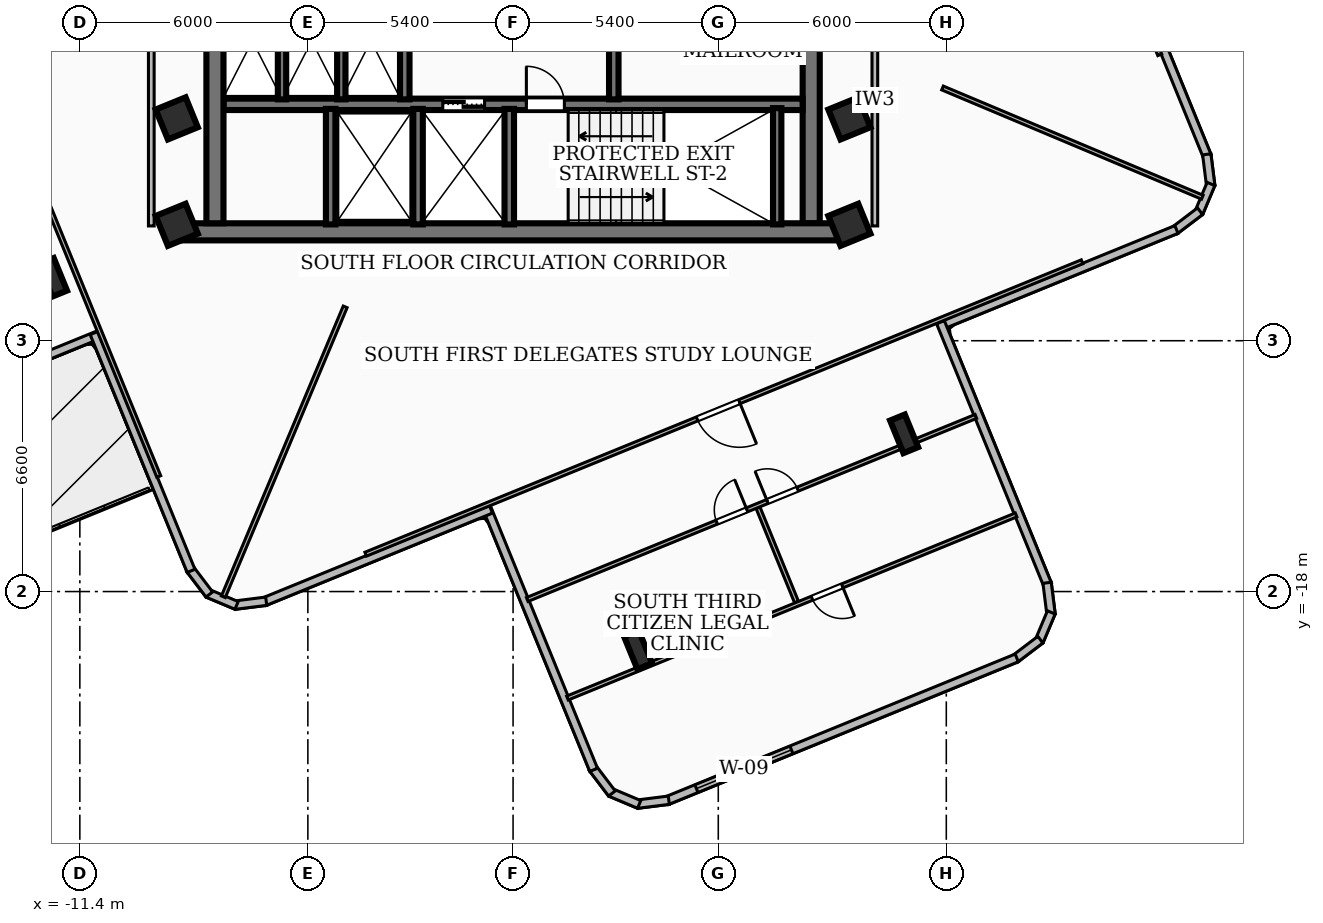
"""IFC4 building model, lengths in metres.
Left out: names, types, materials, properties, quantities, classifications, styles, units other than length and angle.
Written with IfcOpenShell. Run it as: python <this file> out.ifc"""

import sys

from ifc_helpers import new_model, si_unit, direction, frame, frame_2d, origin, origin_2d, place, context, subcontext, project, spatial, rectangle, i_section, extrude, element, fill, save


model = new_model("IFC4")
c1 = context("Model", 3, precision=1e-05, world=origin(), true_north=direction((0.0, 1.0)))
c2 = subcontext(c1, "Body", "Model", "MODEL_VIEW")
j1 = project(units=[si_unit("LENGTHUNIT", "METRE"), si_unit("PLANEANGLEUNIT", "RADIAN")], contexts=[c1])
p1 = place(None, origin())
s1 = spatial("IfcSite", under=j1, at=p1, CompositionType="ELEMENT")
p2 = place(p1, origin())
s2 = spatial("IfcBuilding", under=s1, at=p2, CompositionType="ELEMENT")
p3 = place(p2, frame((0.0, 0.0, 177.48)))
s3 = spatial("IfcBuildingStorey", under=s2, at=p3, CompositionType="ELEMENT", Elevation=177.48)
p4 = place(p3, frame((8.78, -8.535, 0.0), z_axis=(0.0, 0.0, 1.0), x_axis=(-1.0, 0.0, 0.0)))
e1 = element("IfcWall", 1, at=p4, inside=s3, PredefinedType="SHEAR", context=c2, shape_type="SweptSolid", body=[
    extrude(rectangle(XDim=17.56, YDim=0.45, at=frame_2d((8.78, 0.0))), origin(), (0.0, 0.0, 1.0), 3.34),
])
for number, where, z_axis, x_axis in (
    (2, (-7.845, -8.31, 0.0), (0.0, 0.0, 1.0), (0.0, 1.0, 0.0)),
    (3, (7.845, -1.975, 0.0), (0.0, 0.0, 1.0), (0.0, -1.0, 0.0)),
):
    element("IfcWall", number, at=place(p3, frame(where, z_axis=z_axis, x_axis=x_axis)), inside=s3, PredefinedType="SHEAR", context=c2, shape_type="SweptSolid", body=[
        extrude(rectangle(XDim=6.335, YDim=0.45, at=frame_2d((3.167, 0.0))), origin(), (0.0, 0.0, 1.0), 3.34),
    ])
p5 = place(p3, frame((-7.62, -5.18, 0.0), z_axis=(0.0, 0.0, 1.0), x_axis=(1.0, 0.0, 0.0)))
e4 = element("IfcWall", 4, at=p5, inside=s3, PredefinedType="SOLIDWALL", context=c2, shape_type="SweptSolid", body=[
    extrude(rectangle(XDim=15.24, YDim=0.3, at=frame_2d((7.62, 0.0))), origin(), (0.0, 0.0, 1.0), 3.34),
])
p6 = place(p5, frame((5.77, 0.0, 0.0)))
e5 = element("IfcOpeningElement", 5, at=p6, cuts=e4, PredefinedType="OPENING", context=c2, shape_type="SweptSolid", body=[
    extrude(rectangle(XDim=1.1, YDim=2.15, at=frame_2d((0.55, 1.075))), frame((0.0, 0.16, 0.0), z_axis=(0.0, -1.0, 0.0), x_axis=(1.0, 0.0, 0.0)), (0.0, 0.0, 1.0), 0.32),
])
p7 = place(p5, frame((7.97, 0.0, 0.0)))
e6 = element("IfcOpeningElement", 6, at=p7, cuts=e4, PredefinedType="OPENING", context=c2, shape_type="SweptSolid", body=[
    extrude(rectangle(XDim=1.0, YDim=2.1, at=frame_2d((0.5, 1.05))), frame((0.0, 0.16, 0.0), z_axis=(0.0, -1.0, 0.0), x_axis=(1.0, 0.0, 0.0)), (0.0, 0.0, 1.0), 0.32),
])
p8 = place(p3, frame((6.95, -8.34, 0.0), z_axis=(0.0, 0.0, 1.0), x_axis=(0.0, 1.0, 0.0)))
e7 = element("IfcWall", 7, at=p8, inside=s3, PredefinedType="SOLIDWALL", context=c2, shape_type="SweptSolid", body=[
    extrude(rectangle(XDim=3.06, YDim=0.22, at=frame_2d((1.53, 0.0))), origin(), (0.0, 0.0, 1.0), 3.34),
])
for number, where, z_axis, x_axis in (
    (8, (-0.1, -8.34, 0.0), (0.0, 0.0, 1.0), (0.0, 1.0, 0.0)),
    (9, (-2.5, -8.34, 0.0), (0.0, 0.0, 1.0), (0.0, 1.0, 0.0)),
    (10, (-4.8, -8.34, 0.0), (0.0, 0.0, 1.0), (0.0, 1.0, 0.0)),
):
    element("IfcWall", number, at=place(p3, frame(where, z_axis=z_axis, x_axis=x_axis)), inside=s3, PredefinedType="SOLIDWALL", context=c2, shape_type="SweptSolid", body=[
        extrude(rectangle(XDim=3.04, YDim=0.25, at=frame_2d((1.52, 0.0))), origin(), (0.0, 0.0, 1.0), 3.34),
    ])
for number, where, z_axis, x_axis in (
    (11, (-2.85, -5.05, 0.0), (0.0, 0.0, 1.0), (0.0, 1.0, 0.0)),
    (12, (2.65, -5.05, 0.0), (0.0, 0.0, 1.0), (0.0, 1.0, 0.0)),
):
    element("IfcWall", number, at=place(p3, frame(where, z_axis=z_axis, x_axis=x_axis)), inside=s3, PredefinedType="SOLIDWALL", context=c2, shape_type="SweptSolid", body=[
        extrude(rectangle(XDim=3.07, YDim=0.25, at=frame_2d((1.535, 0.0))), origin(), (0.0, 0.0, 1.0), 3.34),
    ])
for number, where, z_axis, x_axis in (
    (13, (-6.08, -5.05, 0.0), (0.0, 0.0, 1.0), (0.0, 1.0, 0.0)),
    (14, (-4.52, -5.05, 0.0), (0.0, 0.0, 1.0), (0.0, 1.0, 0.0)),
):
    element("IfcWall", number, at=place(p3, frame(where, z_axis=z_axis, x_axis=x_axis)), inside=s3, PredefinedType="SOLIDWALL", context=c2, shape_type="SweptSolid", body=[
        extrude(rectangle(XDim=3.07, YDim=0.22, at=frame_2d((1.535, 0.0))), origin(), (0.0, 0.0, 1.0), 3.34),
    ])
for number, where, z_axis, x_axis in (
    (15, (-8.85, -5.55, 0.0), (0.0, 0.0, 1.0), (0.926, 0.378, 0.0)),
    (16, (8.85, -5.55, 0.0), (0.0, 0.0, 1.0), (0.926, 0.378, 0.0)),
    (17, (8.85, -8.35, 0.0), (0.0, 0.0, 1.0), (0.926, 0.378, 0.0)),
    (18, (-8.85, -8.35, 0.0), (0.0, 0.0, 1.0), (0.926, 0.378, 0.0)),
):
    element("IfcColumn", number, at=place(p3, frame(where, z_axis=z_axis, x_axis=x_axis)), inside=s3, PredefinedType="COLUMN", context=c2, shape_type="SweptSolid", body=[
        extrude(rectangle(XDim=0.85, YDim=0.85, at=origin_2d()), origin(), (0.0, 0.0, 1.0), 3.6),
    ])
for number, where, z_axis, x_axis in (
    (19, (-12.106, -9.731, 0.0), (0.0, 0.0, 1.0), (0.926, 0.378, 0.0)),
    (20, (3.29, -19.536, 0.0), (0.0, 0.0, 1.0), (0.926, 0.378, 0.0)),
    (21, (10.29, -13.85, 0.0), (0.0, 0.0, 1.0), (0.926, 0.378, 0.0)),
):
    element("IfcColumn", number, at=place(p3, frame(where, z_axis=z_axis, x_axis=x_axis)), inside=s3, PredefinedType="COLUMN", context=c2, shape_type="SweptSolid", body=[
        extrude(i_section(OverallWidth=0.418, OverallDepth=0.927, WebThickness=0.019, FlangeThickness=0.032, at=origin_2d()), origin(), (0.0, 0.0, 1.0), 3.6),
    ])
p9 = place(p3, frame((-10.912, -11.246, 0.0), z_axis=(0.0, 0.0, 1.0), x_axis=(-0.925847643695, -0.377896997427, 0.0)))
e22 = element("IfcWall", 22, at=p9, inside=s3, PredefinedType="SOLIDWALL", context=c2, shape_type="SweptSolid", body=[
    extrude(rectangle(XDim=9.058, YDim=0.22, at=frame_2d((4.529, 0.0))), origin(), (0.0, 0.0, 1.0), 3.34),
])
p10 = place(p9, frame((4.4, 0.0, 0.0)))
e23 = element("IfcOpeningElement", 23, at=p10, cuts=e22, PredefinedType="OPENING", context=c2, shape_type="SweptSolid", body=[
    extrude(rectangle(XDim=1.1, YDim=2.1, at=frame_2d((0.55, 1.05))), frame((0.0, 0.12, 0.0), z_axis=(0.0, -1.0, 0.0), x_axis=(1.0, 0.0, 0.0)), (0.0, 0.0, 1.0), 0.24),
])
p11 = place(p3, frame((15.834, -0.583, 0.0), z_axis=(0.0, 0.0, 1.0), x_axis=(0.377776256629, -0.925896916469, 0.0)))
e24 = element("IfcWall", 24, at=p11, inside=s3, PredefinedType="SOLIDWALL", context=c2, shape_type="SweptSolid", body=[
    extrude(rectangle(XDim=6.438, YDim=0.22, at=frame_2d((3.219, 0.0))), origin(), (0.0, 0.0, 1.0), 3.34),
])
p12 = place(p3, frame((18.254, -6.496, 0.0), z_axis=(0.0, 0.0, 1.0), x_axis=(0.124646916858, -0.992201162123, 0.0)))
e25 = element("IfcWall", 25, at=p12, inside=s3, PredefinedType="SOLIDWALL", context=c2, shape_type="SweptSolid", body=[
    extrude(rectangle(XDim=0.834, YDim=0.22, at=frame_2d((0.417, 0.0))), origin(), (0.0, 0.0, 1.0), 3.34),
])
p13 = place(p3, frame((18.365, -7.276, 0.0), z_axis=(0.0, 0.0, 1.0), x_axis=(-0.387977068381, -0.9216690265, 0.0)))
e26 = element("IfcWall", 26, at=p13, inside=s3, PredefinedType="SOLIDWALL", context=c2, shape_type="SweptSolid", body=[
    extrude(rectangle(XDim=0.819, YDim=0.22, at=frame_2d((0.41, 0.0))), origin(), (0.0, 0.0, 1.0), 3.34),
])
p14 = place(p3, frame((18.077, -7.993, 0.0), z_axis=(0.0, 0.0, 1.0), x_axis=(-0.796365329878, -0.604815890473, 0.0)))
e27 = element("IfcWall", 27, at=p14, inside=s3, PredefinedType="SOLIDWALL", context=c2, shape_type="SweptSolid", body=[
    extrude(rectangle(XDim=0.833, YDim=0.22, at=frame_2d((0.417, 0.0))), origin(), (0.0, 0.0, 1.0), 3.34),
])
p15 = place(p3, frame((17.456, -8.473, 0.0), z_axis=(0.0, 0.0, 1.0), x_axis=(-0.925916493636, -0.377728271133, 0.0)))
e28 = element("IfcWall", 28, at=p15, inside=s3, PredefinedType="SOLIDWALL", context=c2, shape_type="SweptSolid", body=[
    extrude(rectangle(XDim=6.759, YDim=0.22, at=frame_2d((3.379, 0.0))), origin(), (0.0, 0.0, 1.0), 3.34),
])
p16 = place(p3, frame((11.246, -10.912, 0.0), z_axis=(0.0, 0.0, 1.0), x_axis=(0.377850036169, -0.925866810166, 0.0)))
e29 = element("IfcWall", 29, at=p16, inside=s3, PredefinedType="SOLIDWALL", context=c2, shape_type="SweptSolid", body=[
    extrude(rectangle(XDim=7.458, YDim=0.22, at=frame_2d((3.729, 0.0))), origin(), (0.0, 0.0, 1.0), 3.34),
])
p17 = place(p3, frame((14.052, -17.769, 0.0), z_axis=(0.0, 0.0, 1.0), x_axis=(0.124646916858, -0.992201162123, 0.0)))
e30 = element("IfcWall", 30, at=p17, inside=s3, PredefinedType="SOLIDWALL", context=c2, shape_type="SweptSolid", body=[
    extrude(rectangle(XDim=0.834, YDim=0.22, at=frame_2d((0.417, 0.0))), origin(), (0.0, 0.0, 1.0), 3.34),
])
p18 = place(p3, frame((14.163, -18.549, 0.0), z_axis=(0.0, 0.0, 1.0), x_axis=(-0.388336782412, -0.92151752204, 0.0)))
e31 = element("IfcWall", 31, at=p18, inside=s3, PredefinedType="SOLIDWALL", context=c2, shape_type="SweptSolid", body=[
    extrude(rectangle(XDim=0.819, YDim=0.22, at=frame_2d((0.41, 0.0))), origin(), (0.0, 0.0, 1.0), 3.34),
])
p19 = place(p3, frame((13.875, -19.266, 0.0), z_axis=(0.0, 0.0, 1.0), x_axis=(-0.796613459657, -0.604489037034, 0.0)))
e32 = element("IfcWall", 32, at=p19, inside=s3, PredefinedType="SOLIDWALL", context=c2, shape_type="SweptSolid", body=[
    extrude(rectangle(XDim=0.833, YDim=0.22, at=frame_2d((0.417, 0.0))), origin(), (0.0, 0.0, 1.0), 3.34),
])
p20 = place(p3, frame((13.254, -19.746, 0.0), z_axis=(0.0, 0.0, 1.0), x_axis=(-0.925876400685, -0.377826535137, 0.0)))
e33 = element("IfcWall", 33, at=p20, inside=s3, PredefinedType="SOLIDWALL", context=c2, shape_type="SweptSolid", body=[
    extrude(rectangle(XDim=9.941, YDim=0.22, at=frame_2d((4.97, 0.0))), origin(), (0.0, 0.0, 1.0), 3.34),
])
p21 = place(p20, frame((6.404, 0.0, 0.85)))
e34 = element("IfcOpeningElement", 34, at=p21, cuts=e33, PredefinedType="OPENING", context=c2, shape_type="SweptSolid", body=[
    extrude(rectangle(XDim=2.7, YDim=1.65, at=frame_2d((1.35, 0.825))), frame((0.0, 0.12, 0.0), z_axis=(0.0, -1.0, 0.0), x_axis=(1.0, 0.0, 0.0)), (0.0, 0.0, 1.0), 0.24),
])
p22 = place(p3, frame((4.098, -23.49, 0.0), z_axis=(0.0, 0.0, 1.0), x_axis=(-0.992201162123, -0.124646916858, 0.0)))
e35 = element("IfcWall", 35, at=p22, inside=s3, PredefinedType="SOLIDWALL", context=c2, shape_type="SweptSolid", body=[
    extrude(rectangle(XDim=0.834, YDim=0.22, at=frame_2d((0.417, 0.0))), origin(), (0.0, 0.0, 1.0), 3.34),
])
p23 = place(p3, frame((3.318, -23.601, 0.0), z_axis=(0.0, 0.0, 1.0), x_axis=(-0.921562448508, 0.38823015532, 0.0)))
e36 = element("IfcWall", 36, at=p23, inside=s3, PredefinedType="SOLIDWALL", context=c2, shape_type="SweptSolid", body=[
    extrude(rectangle(XDim=0.819, YDim=0.22, at=frame_2d((0.41, 0.0))), origin(), (0.0, 0.0, 1.0), 3.34),
])
p24 = place(p3, frame((2.601, -23.313, 0.0), z_axis=(0.0, 0.0, 1.0), x_axis=(-0.604853461147, 0.796336794666, 0.0)))
e37 = element("IfcWall", 37, at=p24, inside=s3, PredefinedType="SOLIDWALL", context=c2, shape_type="SweptSolid", body=[
    extrude(rectangle(XDim=0.835, YDim=0.22, at=frame_2d((0.417, 0.0))), origin(), (0.0, 0.0, 1.0), 3.34),
])
p25 = place(p3, frame((2.12, -22.691, 0.0), z_axis=(0.0, 0.0, 1.0), x_axis=(-0.377754391584, 0.92590583735, 0.0)))
e38 = element("IfcWall", 38, at=p25, inside=s3, PredefinedType="SOLIDWALL", context=c2, shape_type="SweptSolid", body=[
    extrude(rectangle(XDim=7.458, YDim=0.22, at=frame_2d((3.729, 0.0))), origin(), (0.0, 0.0, 1.0), 3.34),
])
p26 = place(p3, frame((-0.583, -15.834, 0.0), z_axis=(0.0, 0.0, 1.0), x_axis=(-0.925896916469, -0.377776256629, 0.0)))
e39 = element("IfcWall", 39, at=p26, inside=s3, PredefinedType="SOLIDWALL", context=c2, shape_type="SweptSolid", body=[
    extrude(rectangle(XDim=6.438, YDim=0.22, at=frame_2d((3.219, 0.0))), origin(), (0.0, 0.0, 1.0), 3.34),
])
p27 = place(p3, frame((-6.496, -18.254, 0.0), z_axis=(0.0, 0.0, 1.0), x_axis=(-0.992201162123, -0.124646916858, 0.0)))
e40 = element("IfcWall", 40, at=p27, inside=s3, PredefinedType="SOLIDWALL", context=c2, shape_type="SweptSolid", body=[
    extrude(rectangle(XDim=0.834, YDim=0.22, at=frame_2d((0.417, 0.0))), origin(), (0.0, 0.0, 1.0), 3.34),
])
p28 = place(p3, frame((-7.276, -18.365, 0.0), z_axis=(0.0, 0.0, 1.0), x_axis=(-0.9216690265, 0.387977068381, 0.0)))
e41 = element("IfcWall", 41, at=p28, inside=s3, PredefinedType="SOLIDWALL", context=c2, shape_type="SweptSolid", body=[
    extrude(rectangle(XDim=0.819, YDim=0.22, at=frame_2d((0.41, 0.0))), origin(), (0.0, 0.0, 1.0), 3.34),
])
p29 = place(p3, frame((-7.993, -18.077, 0.0), z_axis=(0.0, 0.0, 1.0), x_axis=(-0.604815890473, 0.796365329878, 0.0)))
e42 = element("IfcWall", 42, at=p29, inside=s3, PredefinedType="SOLIDWALL", context=c2, shape_type="SweptSolid", body=[
    extrude(rectangle(XDim=0.833, YDim=0.22, at=frame_2d((0.417, 0.0))), origin(), (0.0, 0.0, 1.0), 3.34),
])
p30 = place(p3, frame((-8.473, -17.456, 0.0), z_axis=(0.0, 0.0, 1.0), x_axis=(-0.377728271133, 0.925916493636, 0.0)))
e43 = element("IfcWall", 43, at=p30, inside=s3, PredefinedType="SOLIDWALL", context=c2, shape_type="SweptSolid", body=[
    extrude(rectangle(XDim=6.759, YDim=0.22, at=frame_2d((3.379, 0.0))), origin(), (0.0, 0.0, 1.0), 3.34),
])
p31 = place(p3, frame((-9.52, -8.38, 0.0), z_axis=(0.0, 0.0, 1.0), x_axis=(0.0, 1.0, 0.0)))
e44 = element("IfcWall", 44, at=p31, inside=s3, PredefinedType="PARTITIONING", context=c2, shape_type="SweptSolid", body=[
    extrude(rectangle(XDim=6.63, YDim=0.15, at=frame_2d((3.315, 0.0))), origin(), (0.0, 0.0, 1.0), 2.644),
])
p32 = place(p3, frame((9.52, -8.38, 0.0), z_axis=(0.0, 0.0, 1.0), x_axis=(0.0, 1.0, 0.0)))
e45 = element("IfcWall", 45, at=p32, inside=s3, PredefinedType="PARTITIONING", context=c2, shape_type="SweptSolid", body=[
    extrude(rectangle(XDim=6.63, YDim=0.15, at=frame_2d((3.315, 0.0))), origin(), (0.0, 0.0, 1.0), 3.34),
])
p33 = place(p3, frame((-4.418, -10.509, 0.0), z_axis=(0.0, 0.0, 1.0), x_axis=(-0.387471247296, -0.921881788799, 0.0)))
e46 = element("IfcWall", 46, at=p33, inside=s3, PredefinedType="PARTITIONING", context=c2, shape_type="SweptSolid", body=[
    extrude(rectangle(XDim=8.274, YDim=0.11, at=frame_2d((4.137, 0.0))), origin(), (0.0, 0.0, 1.0), 3.34),
])
p34 = place(p3, frame((11.3, -4.75, 0.0), z_axis=(0.0, 0.0, 1.0), x_axis=(0.92186077199, -0.387521247245, 0.0)))
e47 = element("IfcWall", 47, at=p34, inside=s3, PredefinedType="PARTITIONING", context=c2, shape_type="SweptSolid", body=[
    extrude(rectangle(XDim=7.417, YDim=0.11, at=frame_2d((3.708, 0.0))), origin(), (0.0, 0.0, 1.0), 3.34),
])
p35 = place(p3, frame((9.323, 14.973, 0.0), z_axis=(0.0, 0.0, 1.0), x_axis=(0.377891753295, -0.92584978414, 0.0)))
e48 = element("IfcWall", 48, at=p35, inside=s3, PredefinedType="PARTITIONING", context=c2, shape_type="SweptSolid", body=[
    extrude(rectangle(XDim=20.361, YDim=0.11, at=frame_2d((10.18, 0.0))), origin(), (0.0, 0.0, 1.0), 2.644),
])
p36 = place(p35, frame((9.741, 0.0, 0.0)))
e49 = element("IfcOpeningElement", 49, at=p36, cuts=e48, PredefinedType="OPENING", context=c2, shape_type="SweptSolid", body=[
    extrude(rectangle(XDim=1.2, YDim=2.1, at=frame_2d((0.6, 1.05))), frame((0.0, 0.065, 0.0), z_axis=(0.0, -1.0, 0.0), x_axis=(1.0, 0.0, 0.0)), (0.0, 0.0, 1.0), 0.13),
])
p37 = place(p3, frame((-9.323, -14.973, 0.0), z_axis=(0.0, 0.0, 1.0), x_axis=(-0.377891753295, 0.92584978414, 0.0)))
e50 = element("IfcWall", 50, at=p37, inside=s3, PredefinedType="PARTITIONING", context=c2, shape_type="SweptSolid", body=[
    extrude(rectangle(XDim=20.361, YDim=0.11, at=frame_2d((10.18, 0.0))), origin(), (0.0, 0.0, 1.0), 2.644),
])
p38 = place(p37, frame((9.741, 0.0, 0.0)))
e51 = element("IfcOpeningElement", 51, at=p38, cuts=e50, PredefinedType="OPENING", context=c2, shape_type="SweptSolid", body=[
    extrude(rectangle(XDim=1.2, YDim=2.1, at=frame_2d((0.6, 1.05))), frame((0.0, 0.065, 0.0), z_axis=(0.0, -1.0, 0.0), x_axis=(1.0, 0.0, 0.0)), (0.0, 0.0, 1.0), 0.13),
])
p39 = place(p3, frame((14.973, -9.323, 0.0), z_axis=(0.0, 0.0, 1.0), x_axis=(-0.92584978414, -0.377891753295, 0.0)))
e52 = element("IfcWall", 52, at=p39, inside=s3, PredefinedType="PARTITIONING", context=c2, shape_type="SweptSolid", body=[
    extrude(rectangle(XDim=20.361, YDim=0.11, at=frame_2d((10.18, 0.0))), origin(), (0.0, 0.0, 1.0), 2.644),
])
p40 = place(p39, frame((9.741, 0.0, 0.0)))
e53 = element("IfcOpeningElement", 53, at=p40, cuts=e52, PredefinedType="OPENING", context=c2, shape_type="SweptSolid", body=[
    extrude(rectangle(XDim=1.2, YDim=2.1, at=frame_2d((0.6, 1.05))), frame((0.0, 0.065, 0.0), z_axis=(0.0, -1.0, 0.0), x_axis=(1.0, 0.0, 0.0)), (0.0, 0.0, 1.0), 0.13),
])
p41 = place(p3, frame((6.446, -15.795, 0.0), z_axis=(0.0, 0.0, 1.0), x_axis=(0.377834865886, -0.925873001076, 0.0)))
e54 = element("IfcWall", 54, at=p41, inside=s3, PredefinedType="PARTITIONING", context=c2, shape_type="SweptSolid", body=[
    extrude(rectangle(XDim=2.681, YDim=0.11, at=frame_2d((1.34, 0.0))), origin(), (0.0, 0.0, 1.0), 3.34),
])
p42 = place(p3, frame((0.373, -18.209, 0.0), z_axis=(0.0, 0.0, 1.0), x_axis=(0.925887289182, 0.377799851417, 0.0)))
e55 = element("IfcWall", 55, at=p42, inside=s3, PredefinedType="PARTITIONING", context=c2, shape_type="SweptSolid", body=[
    extrude(rectangle(XDim=12.75, YDim=0.11, at=frame_2d((6.375, 0.0))), origin(), (0.0, 0.0, 1.0), 2.644),
])
p43 = place(p42, frame((5.385, 0.0, 0.0)))
e56 = element("IfcOpeningElement", 56, at=p43, cuts=e55, PredefinedType="OPENING", context=c2, shape_type="SweptSolid", body=[
    extrude(rectangle(XDim=0.86, YDim=2.04, at=frame_2d((0.43, 1.02))), frame((0.0, 0.065, 0.0), z_axis=(0.0, -1.0, 0.0), x_axis=(1.0, 0.0, 0.0)), (0.0, 0.0, 1.0), 0.13),
])
p44 = place(p42, frame((6.825, 0.0, 0.0)))
e57 = element("IfcOpeningElement", 57, at=p44, cuts=e55, PredefinedType="OPENING", context=c2, shape_type="SweptSolid", body=[
    extrude(rectangle(XDim=0.86, YDim=2.04, at=frame_2d((0.43, 1.02))), frame((0.0, 0.065, 0.0), z_axis=(0.0, -1.0, 0.0), x_axis=(1.0, 0.0, 0.0)), (0.0, 0.0, 1.0), 0.13),
])
p45 = place(p3, frame((13.236, -15.984, 0.0), z_axis=(0.0, 0.0, 1.0), x_axis=(-0.92585653016, -0.377875224856, 0.0)))
e58 = element("IfcWall", 58, at=p45, inside=s3, PredefinedType="PARTITIONING", context=c2, shape_type="SweptSolid", body=[
    extrude(rectangle(XDim=12.75, YDim=0.11, at=frame_2d((6.375, 0.0))), origin(), (0.0, 0.0, 1.0), 3.34),
])
p46 = place(p45, frame((4.94, 0.0, 0.0)))
e59 = element("IfcOpeningElement", 59, at=p46, cuts=e58, PredefinedType="OPENING", context=c2, shape_type="SweptSolid", body=[
    extrude(rectangle(XDim=0.86, YDim=2.04, at=frame_2d((0.43, 1.02))), frame((0.0, 0.065, 0.0), z_axis=(0.0, -1.0, 0.0), x_axis=(1.0, 0.0, 0.0)), (0.0, 0.0, 1.0), 0.13),
])
p47 = place(p21, origin())
e60 = element("IfcWindow", 60, at=p47, inside=s3, PartitioningType="SINGLE_PANEL", PredefinedType="WINDOW", context=c2, shape_type="SweptSolid", body=[
    extrude(rectangle(XDim=2.7, YDim=1.65, at=frame_2d((1.35, 0.825))), frame((0.0, 0.03, 0.0), z_axis=(0.0, -1.0, 0.0), x_axis=(1.0, 0.0, 0.0)), (0.0, 0.0, 1.0), 0.06),
])
fill(e34, e60)
p48 = place(p6, origin())
e61 = element("IfcDoor", 61, at=p48, inside=s3, OperationType="DOUBLE_DOOR_SLIDING", PredefinedType="DOOR", context=c2, shape_type="SweptSolid", body=[
    extrude(rectangle(XDim=1.1, YDim=2.15, at=frame_2d((0.55, 1.075))), frame((0.0, 0.025, 0.0), z_axis=(0.0, -1.0, 0.0), x_axis=(1.0, 0.0, 0.0)), (0.0, 0.0, 1.0), 0.05),
])
fill(e5, e61)
p49 = place(p7, origin())
e62 = element("IfcDoor", 62, at=p49, inside=s3, OperationType="SINGLE_SWING_LEFT", PredefinedType="DOOR", context=c2, shape_type="SweptSolid", body=[
    extrude(rectangle(XDim=1.0, YDim=2.1, at=frame_2d((0.5, 1.05))), frame((0.0, 0.025, 0.0), z_axis=(0.0, -1.0, 0.0), x_axis=(1.0, 0.0, 0.0)), (0.0, 0.0, 1.0), 0.05),
])
fill(e6, e62)
p50 = place(p40, origin())
e63 = element("IfcDoor", 63, at=p50, inside=s3, OperationType="SINGLE_SWING_LEFT", PredefinedType="DOOR", context=c2, shape_type="SweptSolid", body=[
    extrude(rectangle(XDim=1.2, YDim=2.1, at=frame_2d((0.6, 1.05))), frame((0.0, 0.025, 0.0), z_axis=(0.0, -1.0, 0.0), x_axis=(1.0, 0.0, 0.0)), (0.0, 0.0, 1.0), 0.05),
])
fill(e53, e63)
p51 = place(p43, origin())
e64 = element("IfcDoor", 64, at=p51, inside=s3, OperationType="SINGLE_SWING_RIGHT", PredefinedType="DOOR", context=c2, shape_type="SweptSolid", body=[
    extrude(rectangle(XDim=0.86, YDim=2.04, at=frame_2d((0.43, 1.02))), frame((0.0, 0.025, 0.0), z_axis=(0.0, -1.0, 0.0), x_axis=(1.0, 0.0, 0.0)), (0.0, 0.0, 1.0), 0.05),
])
fill(e56, e64)
p52 = place(p44, origin())
e65 = element("IfcDoor", 65, at=p52, inside=s3, OperationType="SINGLE_SWING_LEFT", PredefinedType="DOOR", context=c2, shape_type="SweptSolid", body=[
    extrude(rectangle(XDim=0.86, YDim=2.04, at=frame_2d((0.43, 1.02))), frame((0.0, 0.025, 0.0), z_axis=(0.0, -1.0, 0.0), x_axis=(1.0, 0.0, 0.0)), (0.0, 0.0, 1.0), 0.05),
])
fill(e57, e65)
p53 = place(p46, origin())
e66 = element("IfcDoor", 66, at=p53, inside=s3, OperationType="SINGLE_SWING_LEFT", PredefinedType="DOOR", context=c2, shape_type="SweptSolid", body=[
    extrude(rectangle(XDim=0.86, YDim=2.04, at=frame_2d((0.43, 1.02))), frame((0.0, 0.025, 0.0), z_axis=(0.0, -1.0, 0.0), x_axis=(1.0, 0.0, 0.0)), (0.0, 0.0, 1.0), 0.05),
])
fill(e59, e66)
save(model, sys.argv[1])
